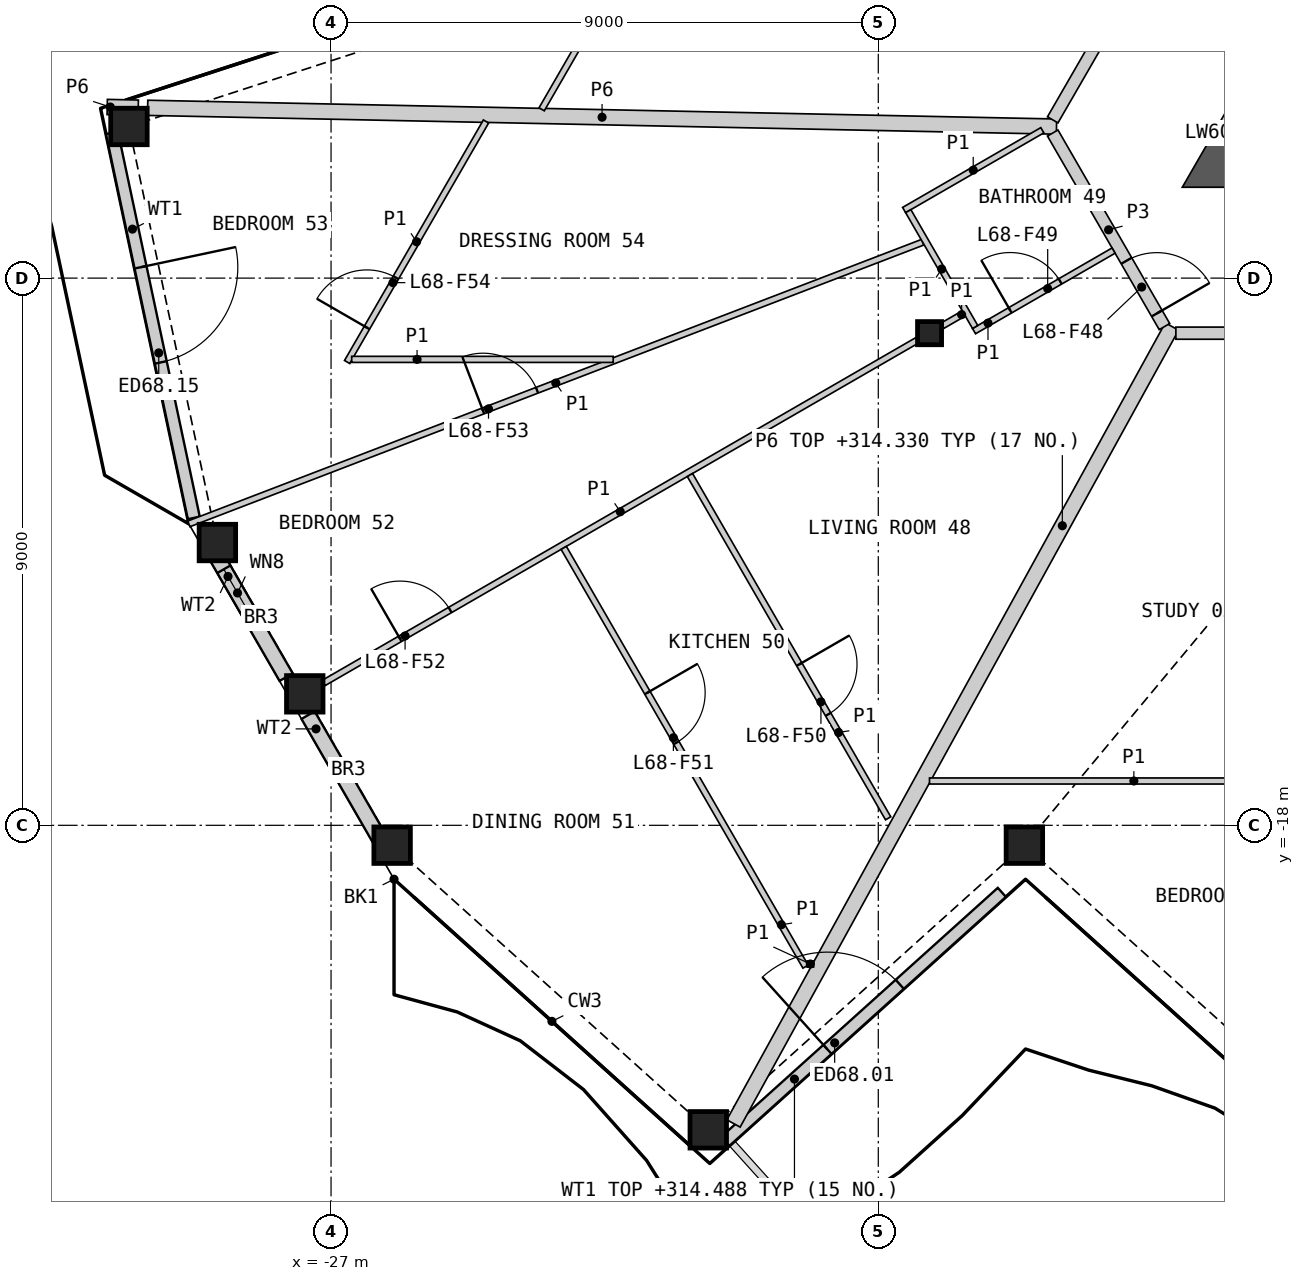
"""IFC4 building model, lengths in metres.
Left out: names, types, materials, properties, quantities, classifications, styles, units other than length and angle.
Written with IfcOpenShell. Run it as: python <this file> out.ifc"""

import sys

from ifc_helpers import new_model, si_unit, direction, frame, frame_2d, origin, origin_2d, place, context, subcontext, project, spatial, polyline, rectangle, hollow_rectangle, i_section, outline, extrude, element, fill, save


model = new_model("IFC4")
c1 = context("Model", 3, precision=1e-05, world=origin(), true_north=direction((0.0, 1.0)))
c2 = subcontext(c1, "Body", "Model", "MODEL_VIEW")
j1 = project(units=[si_unit("LENGTHUNIT", "METRE"), si_unit("PLANEANGLEUNIT", "RADIAN")], contexts=[c1])
p1 = place(None, origin())
s1 = spatial("IfcSite", under=j1, at=p1, CompositionType="ELEMENT")
p2 = place(p1, origin())
s2 = spatial("IfcBuilding", under=s1, at=p2, CompositionType="ELEMENT")
p3 = place(p2, frame((0.0, 0.0, 312.0)))
s3 = spatial("IfcBuildingStorey", under=s2, at=p3, CompositionType="ELEMENT", Elevation=312.0)
for number, where, z_axis, x_axis in (
    (1, (-25.995, -18.327, 0.0), (0.0, 0.0, 1.0), (1.0, 0.0, 0.0)),
    (2, (-20.796, -23.008, 0.0), (0.0, 0.0, 1.0), (1.0, 0.0, 0.0)),
    (3, (-15.597, -18.327, 0.0), (0.0, 0.0, 1.0), (1.0, 0.0, 0.0)),
    (4, (-30.324, -6.506, 0.0), (0.0, 0.0, 1.0), (1.0, 0.0, 0.0)),
    (5, (-28.869, -13.349, 0.0), (0.0, 0.0, 1.0), (1.0, 0.0, 0.0)),
    (6, (-27.432, -15.838, 0.0), (0.0, 0.0, 1.0), (1.0, 0.0, 0.0)),
):
    element("IfcColumn", number, at=place(p3, frame(where, z_axis=z_axis, x_axis=x_axis)), inside=s3, PredefinedType="COLUMN", context=c2, shape_type="SweptSolid", body=[
        extrude(hollow_rectangle(XDim=0.6, YDim=0.6, WallThickness=0.04, at=origin_2d()), origin(), (0.0, 0.0, 1.0), 3.4),
    ])
p4 = place(p3, frame((-17.157, -9.906, 0.0), z_axis=(0.0, 0.0, 1.0), x_axis=(1.0, 0.0, 0.0)))
e7 = element("IfcColumn", 7, at=p4, inside=s3, PredefinedType="COLUMN", context=c2, shape_type="SweptSolid", body=[
    extrude(i_section(OverallWidth=0.396, OverallDepth=0.381, WebThickness=0.019, FlangeThickness=0.03, at=origin_2d()), origin(), (0.0, 0.0, 1.0), 3.4),
])
p5 = place(p3, frame((-20.516, -23.198, 0.0), z_axis=(0.0, 0.0, 1.0), x_axis=(0.743121537674, 0.66915646918, 0.0)))
e8 = element("IfcWall", 8, at=p5, inside=s3, PredefinedType="SOLIDWALL", context=c2, shape_type="SweptSolid", body=[
    extrude(rectangle(XDim=6.12, YDim=0.2, at=frame_2d((3.06, 0.0))), origin(), (0.0, 0.0, 1.0), 2.488),
])
p6 = place(p5, frame((2.26, 0.0, 0.0)))
e9 = element("IfcOpeningElement", 9, at=p6, cuts=e8, PredefinedType="OPENING", context=c2, shape_type="SweptSolid", body=[
    extrude(rectangle(XDim=1.6, YDim=2.25, at=frame_2d((0.8, 1.125))), frame((0.0, 0.11, 0.0), z_axis=(0.0, -1.0, 0.0), x_axis=(1.0, 0.0, 0.0)), (0.0, 0.0, 1.0), 0.22),
])
p7 = place(p3, frame((-30.603, -6.611, 0.0), z_axis=(0.0, 0.0, 1.0), x_axis=(0.207921893309, -0.978145432072, 0.0)))
e10 = element("IfcWall", 10, at=p7, inside=s3, PredefinedType="SOLIDWALL", context=c2, shape_type="SweptSolid", body=[
    extrude(rectangle(XDim=6.475, YDim=0.2, at=frame_2d((3.237, 0.0))), origin(), (0.0, 0.0, 1.0), 2.488),
])
p8 = place(p7, frame((2.26, 0.0, 0.0)))
e11 = element("IfcOpeningElement", 11, at=p8, cuts=e10, PredefinedType="OPENING", context=c2, shape_type="SweptSolid", body=[
    extrude(rectangle(XDim=1.6, YDim=2.25, at=frame_2d((0.8, 1.125))), frame((0.0, 0.11, 0.0), z_axis=(0.0, -1.0, 0.0), x_axis=(1.0, 0.0, 0.0)), (0.0, 0.0, 1.0), 0.22),
])
p9 = place(p3, frame((-29.013, -13.356, 0.0), z_axis=(0.0, 0.0, 1.0), x_axis=(0.500012659481, -0.866018094706, 0.0)))
e12 = element("IfcWall", 12, at=p9, inside=s3, PredefinedType="SOLIDWALL", context=c2, shape_type="SweptSolid", body=[
    extrude(rectangle(XDim=2.549, YDim=0.25, at=frame_2d((1.274, 0.0))), origin(), (0.0, 0.0, 1.0), 2.488),
])
p10 = place(p9, frame((0.5, 0.0, 1.5)))
e13 = element("IfcOpeningElement", 13, at=p10, cuts=e12, PredefinedType="OPENING", context=c2, shape_type="SweptSolid", body=[
    extrude(rectangle(XDim=0.9, YDim=0.7, at=frame_2d((0.45, 0.35))), frame((0.0, 0.135, 0.0), z_axis=(0.0, -1.0, 0.0), x_axis=(1.0, 0.0, 0.0)), (0.0, 0.0, 1.0), 0.27),
])
p11 = place(p3, frame((-27.378, -16.188, 0.0), z_axis=(0.0, 0.0, 1.0), x_axis=(0.499992367345, -0.866029810455, 0.0)))
e14 = element("IfcWall", 14, at=p11, inside=s3, PredefinedType="SOLIDWALL", context=c2, shape_type="SweptSolid", body=[
    extrude(rectangle(XDim=2.61, YDim=0.25, at=frame_2d((1.305, 0.0))), origin(), (0.0, 0.0, 1.0), 2.488),
])
p12 = place(p3, origin())
e15 = element("IfcWall", 15, at=p12, inside=s3, PredefinedType="SHEAR", context=c2, shape_type="SweptSolid", body=[
    extrude(outline(polyline([(-12.48, -6.606), (-11.961, -6.906), (-11.961, -7.506), (-13.0, -7.506), (-12.48, -6.606)])), origin(), (0.0, 0.0, 1.0), 3.1),
])
p13 = place(p3, frame((-10.925, -4.511, 0.0), z_axis=(0.0, 0.0, 1.0), x_axis=(-0.500018667571, -0.866014625789, 0.0)))
e16 = element("IfcWall", 16, at=p13, inside=s3, PredefinedType="SHEAR", context=c2, shape_type="SweptSolid", body=[
    extrude(rectangle(XDim=2.592, YDim=0.6, at=frame_2d((1.296, 0.0))), origin(), (0.0, 0.0, 1.0), 3.1),
])
p14 = place(p13, frame((0.6, 0.0, 0.0)))
e17 = element("IfcOpeningElement", 17, at=p14, cuts=e16, PredefinedType="OPENING", context=c2, shape_type="SweptSolid", body=[
    extrude(rectangle(XDim=1.0, YDim=2.1, at=frame_2d((0.5, 1.05))), frame((0.0, 0.31, 0.0), z_axis=(0.0, -1.0, 0.0), x_axis=(1.0, 0.0, 0.0)), (0.0, 0.0, 1.0), 0.62),
])
p15 = place(p3, frame((-20.381, -22.904, 0.0), z_axis=(0.0, 0.0, 1.0), x_axis=(0.481994550341, 0.876174214093, 0.0)))
e18 = element("IfcWall", 18, at=p15, inside=s3, PredefinedType="PARTITIONING", context=c2, shape_type="SweptSolid", body=[
    extrude(rectangle(XDim=14.96, YDim=0.25, at=frame_2d((7.48, 0.0))), origin(), (0.0, 0.0, 1.0), 2.33),
])
p16 = place(p3, frame((-30.016, -6.199, 0.0), z_axis=(0.0, 0.0, 1.0), x_axis=(0.999786619639, -0.02065708573, 0.0)))
e19 = element("IfcWall", 19, at=p16, inside=s3, PredefinedType="PARTITIONING", context=c2, shape_type="SweptSolid", body=[
    extrude(rectangle(XDim=14.951, YDim=0.25, at=frame_2d((7.475, 0.0))), origin(), (0.0, 0.0, 1.0), 2.33),
])
p17 = place(p3, frame((-13.106, -9.906, 0.0), z_axis=(0.0, 0.0, 1.0), x_axis=(1.0, 0.0, 0.0)))
e20 = element("IfcWall", 20, at=p17, inside=s3, PredefinedType="PARTITIONING", context=c2, shape_type="SweptSolid", body=[
    extrude(rectangle(XDim=4.32, YDim=0.2, at=frame_2d((2.16, 0.0))), origin(), (0.0, 0.0, 1.0), 3.1),
])
p18 = place(p3, frame((-15.131, -6.397, 0.0), z_axis=(0.0, 0.0, 1.0), x_axis=(0.500003406062, 0.866023437285, 0.0)))
e21 = element("IfcWall", 21, at=p18, inside=s3, PredefinedType="PARTITIONING", context=c2, shape_type="SweptSolid", body=[
    extrude(rectangle(XDim=4.288, YDim=0.2, at=frame_2d((2.144, 0.0))), origin(), (0.0, 0.0, 1.0), 3.1),
])
p19 = place(p3, frame((-15.131, -6.614, 0.0), z_axis=(0.0, 0.0, 1.0), x_axis=(0.499967746641, -0.866044024469, 0.0)))
e22 = element("IfcWall", 22, at=p19, inside=s3, PredefinedType="PARTITIONING", context=c2, shape_type="SweptSolid", body=[
    extrude(rectangle(XDim=3.676, YDim=0.2, at=frame_2d((1.838, 0.0))), origin(), (0.0, 0.0, 1.0), 3.1),
])
p20 = place(p19, frame((2.426, 0.0, 0.0)))
e23 = element("IfcOpeningElement", 23, at=p20, cuts=e22, PredefinedType="OPENING", context=c2, shape_type="SweptSolid", body=[
    extrude(rectangle(XDim=1.0, YDim=2.1, at=frame_2d((0.5, 1.05))), frame((0.0, 0.11, 0.0), z_axis=(0.0, -1.0, 0.0), x_axis=(1.0, 0.0, 0.0)), (0.0, 0.0, 1.0), 0.22),
])
p21 = place(p3, frame((-30.681, -6.186, 0.0), z_axis=(0.0, 0.0, 1.0), x_axis=(0.999788216533, -0.020579652135, 0.0)))
e24 = element("IfcWall", 24, at=p21, inside=s3, PredefinedType="PARTITIONING", context=c2, shape_type="SweptSolid", body=[
    extrude(rectangle(XDim=0.51, YDim=0.25, at=frame_2d((0.255, 0.0))), origin(), (0.0, 0.0, 1.0), 2.33),
])
p22 = place(p3, frame((-29.338, -13.042, 0.0), z_axis=(0.0, 0.0, 1.0), x_axis=(0.93358243931, 0.358362705944, 0.0)))
e25 = element("IfcWall", 25, at=p22, inside=s3, PredefinedType="PARTITIONING", context=c2, shape_type="SweptSolid", body=[
    extrude(rectangle(XDim=12.928, YDim=0.1, at=frame_2d((6.464, 0.0))), origin(), (0.0, 0.0, 1.0), 2.33),
])
p23 = place(p22, frame((5.183, 0.0, 0.0)))
e26 = element("IfcOpeningElement", 26, at=p23, cuts=e25, PredefinedType="OPENING", context=c2, shape_type="SweptSolid", body=[
    extrude(rectangle(XDim=0.95, YDim=2.1, at=frame_2d((0.475, 1.05))), frame((0.0, 0.06, 0.0), z_axis=(0.0, -1.0, 0.0), x_axis=(1.0, 0.0, 0.0)), (0.0, 0.0, 1.0), 0.12),
])
p24 = place(p3, frame((-27.122, -15.659, 0.0), z_axis=(0.0, 0.0, 1.0), x_axis=(0.866021046153, 0.500007547564, 0.0)))
e27 = element("IfcWall", 27, at=p24, inside=s3, PredefinedType="PARTITIONING", context=c2, shape_type="SweptSolid", body=[
    extrude(rectangle(XDim=11.267, YDim=0.1, at=frame_2d((5.634, 0.0))), origin(), (0.0, 0.0, 1.0), 2.33),
])
p25 = place(p24, frame((1.452, 0.0, 0.0)))
e28 = element("IfcOpeningElement", 28, at=p25, cuts=e27, PredefinedType="OPENING", context=c2, shape_type="SweptSolid", body=[
    extrude(rectangle(XDim=0.95, YDim=2.1, at=frame_2d((0.475, 1.05))), frame((0.0, 0.06, 0.0), z_axis=(0.0, -1.0, 0.0), x_axis=(1.0, 0.0, 0.0)), (0.0, 0.0, 1.0), 0.12),
])
p26 = place(p3, frame((-23.173, -13.437, 0.0), z_axis=(0.0, 0.0, 1.0), x_axis=(0.500018284498, -0.866014846967, 0.0)))
e29 = element("IfcWall", 29, at=p26, inside=s3, PredefinedType="PARTITIONING", context=c2, shape_type="SweptSolid", body=[
    extrude(rectangle(XDim=7.953, YDim=0.1, at=frame_2d((3.977, 0.0))), origin(), (0.0, 0.0, 1.0), 2.33),
])
p27 = place(p26, frame((2.751, 0.0, 0.0)))
e30 = element("IfcOpeningElement", 30, at=p27, cuts=e29, PredefinedType="OPENING", context=c2, shape_type="SweptSolid", body=[
    extrude(rectangle(XDim=0.95, YDim=2.1, at=frame_2d((0.475, 1.05))), frame((0.0, 0.06, 0.0), z_axis=(0.0, -1.0, 0.0), x_axis=(1.0, 0.0, 0.0)), (0.0, 0.0, 1.0), 0.12),
])
p28 = place(p3, frame((-23.536, -6.224, 0.0), z_axis=(0.0, 0.0, 1.0), x_axis=(0.500002256251, 0.866024101133, 0.0)))
e31 = element("IfcWall", 31, at=p28, inside=s3, PredefinedType="PARTITIONING", context=c2, shape_type="SweptSolid", body=[
    extrude(rectangle(XDim=6.722, YDim=0.1, at=frame_2d((3.361, 0.0))), origin(), (0.0, 0.0, 1.0), 2.33),
])
p29 = place(p28, frame((3.292, 0.0, 0.0)))
e32 = element("IfcOpeningElement", 32, at=p29, cuts=e31, PredefinedType="OPENING", context=c2, shape_type="SweptSolid", body=[
    extrude(rectangle(XDim=0.95, YDim=2.1, at=frame_2d((0.475, 1.05))), frame((0.0, 0.06, 0.0), z_axis=(0.0, -1.0, 0.0), x_axis=(1.0, 0.0, 0.0)), (0.0, 0.0, 1.0), 0.12),
])
p30 = place(p3, frame((-17.158, -17.271, 0.0), z_axis=(0.0, 0.0, 1.0), x_axis=(1.0, 0.0, 0.0)))
e33 = element("IfcWall", 33, at=p30, inside=s3, PredefinedType="PARTITIONING", context=c2, shape_type="SweptSolid", body=[
    extrude(rectangle(XDim=6.722, YDim=0.1, at=frame_2d((3.361, 0.0))), origin(), (0.0, 0.0, 1.0), 2.33),
])
p31 = place(p30, frame((5.015, 0.0, 0.0)))
e34 = element("IfcOpeningElement", 34, at=p31, cuts=e33, PredefinedType="OPENING", context=c2, shape_type="SweptSolid", body=[
    extrude(rectangle(XDim=0.95, YDim=2.1, at=frame_2d((0.475, 1.05))), frame((0.0, 0.06, 0.0), z_axis=(0.0, -1.0, 0.0), x_axis=(1.0, 0.0, 0.0)), (0.0, 0.0, 1.0), 0.12),
])
p32 = place(p3, frame((-21.098, -12.239, 0.0), z_axis=(0.0, 0.0, 1.0), x_axis=(0.499973122483, -0.86604092097, 0.0)))
e35 = element("IfcWall", 35, at=p32, inside=s3, PredefinedType="PARTITIONING", context=c2, shape_type="SweptSolid", body=[
    extrude(rectangle(XDim=6.52, YDim=0.1, at=frame_2d((3.26, 0.0))), origin(), (0.0, 0.0, 1.0), 2.33),
])
p33 = place(p32, frame((3.596, 0.0, 0.0)))
e36 = element("IfcOpeningElement", 36, at=p33, cuts=e35, PredefinedType="OPENING", context=c2, shape_type="SweptSolid", body=[
    extrude(rectangle(XDim=0.95, YDim=2.1, at=frame_2d((0.475, 1.05))), frame((0.0, 0.06, 0.0), z_axis=(0.0, -1.0, 0.0), x_axis=(1.0, 0.0, 0.0)), (0.0, 0.0, 1.0), 0.12),
])
p34 = place(p3, frame((-26.736, -10.38, 0.0), z_axis=(0.0, 0.0, 1.0), x_axis=(0.500024700597, 0.866011142419, 0.0)))
e37 = element("IfcWall", 37, at=p34, inside=s3, PredefinedType="PARTITIONING", context=c2, shape_type="SweptSolid", body=[
    extrude(rectangle(XDim=4.568, YDim=0.1, at=frame_2d((2.284, 0.0))), origin(), (0.0, 0.0, 1.0), 2.33),
])
p35 = place(p34, frame((0.652, 0.0, 0.0)))
e38 = element("IfcOpeningElement", 38, at=p35, cuts=e37, PredefinedType="OPENING", context=c2, shape_type="SweptSolid", body=[
    extrude(rectangle(XDim=0.95, YDim=2.1, at=frame_2d((0.475, 1.05))), frame((0.0, 0.06, 0.0), z_axis=(0.0, -1.0, 0.0), x_axis=(1.0, 0.0, 0.0)), (0.0, 0.0, 1.0), 0.12),
])
p36 = place(p3, frame((-26.66, -10.337, 0.0), z_axis=(0.0, 0.0, 1.0), x_axis=(1.0, 0.0, 0.0)))
e39 = element("IfcWall", 39, at=p36, inside=s3, PredefinedType="PARTITIONING", context=c2, shape_type="SweptSolid", body=[
    extrude(rectangle(XDim=4.301, YDim=0.1, at=frame_2d((2.15, 0.0))), origin(), (0.0, 0.0, 1.0), 2.33),
])
p37 = place(p3, frame((-17.575, -7.881, 0.0), z_axis=(0.0, 0.0, 1.0), x_axis=(0.866013657776, 0.500020344131, 0.0)))
e40 = element("IfcWall", 40, at=p37, inside=s3, PredefinedType="PARTITIONING", context=c2, shape_type="SweptSolid", body=[
    extrude(rectangle(XDim=2.625, YDim=0.1, at=frame_2d((1.312, 0.0))), origin(), (0.0, 0.0, 1.0), 2.33),
])
p38 = place(p3, frame((-16.426, -9.872, 0.0), z_axis=(0.0, 0.0, 1.0), x_axis=(0.866029095148, 0.499993606316, 0.0)))
e41 = element("IfcWall", 41, at=p38, inside=s3, PredefinedType="PARTITIONING", context=c2, shape_type="SweptSolid", body=[
    extrude(rectangle(XDim=2.65, YDim=0.1, at=frame_2d((1.325, 0.0))), origin(), (0.0, 0.0, 1.0), 2.33),
])
p39 = place(p38, frame((0.686, 0.0, 0.0)))
e42 = element("IfcOpeningElement", 42, at=p39, cuts=e41, PredefinedType="OPENING", context=c2, shape_type="SweptSolid", body=[
    extrude(rectangle(XDim=0.95, YDim=2.1, at=frame_2d((0.475, 1.05))), frame((0.0, 0.06, 0.0), z_axis=(0.0, -1.0, 0.0), x_axis=(1.0, 0.0, 0.0)), (0.0, 0.0, 1.0), 0.12),
])
p40 = place(p3, frame((-17.507, -7.899, 0.0), z_axis=(0.0, 0.0, 1.0), x_axis=(0.499946605688, -0.86605622881, 0.0)))
e43 = element("IfcWall", 43, at=p40, inside=s3, PredefinedType="PARTITIONING", context=c2, shape_type="SweptSolid", body=[
    extrude(rectangle(XDim=2.2, YDim=0.1, at=frame_2d((1.1, 0.0))), origin(), (0.0, 0.0, 1.0), 2.33),
])
p41 = place(p3, frame((-16.949, -9.786, 0.0), z_axis=(0.0, 0.0, 1.0), x_axis=(0.866036909293, 0.499980071345, 0.0)))
e44 = element("IfcWall", 44, at=p41, inside=s3, PredefinedType="PARTITIONING", context=c2, shape_type="SweptSolid", body=[
    extrude(rectangle(XDim=0.41, YDim=0.1, at=frame_2d((0.205, 0.0))), origin(), (0.0, 0.0, 1.0), 2.33),
])
p42 = place(p3, frame((-19.171, -20.281, 0.0), z_axis=(0.0, 0.0, 1.0), x_axis=(1.0, 0.0, 0.0)))
e45 = element("IfcWall", 45, at=p42, inside=s3, PredefinedType="PARTITIONING", context=c2, shape_type="SweptSolid", body=[
    extrude(rectangle(XDim=0.108, YDim=0.1, at=frame_2d((0.054, 0.0))), origin(), (0.0, 0.0, 1.0), 2.33),
])
p43 = place(p6, origin())
e46 = element("IfcDoor", 46, at=p43, inside=s3, OperationType="DOUBLE_DOOR_SINGLE_SWING", PredefinedType="DOOR", context=c2, shape_type="SweptSolid", body=[
    extrude(rectangle(XDim=1.6, YDim=2.25, at=frame_2d((0.8, 1.125))), frame((0.0, 0.025, 0.0), z_axis=(0.0, -1.0, 0.0), x_axis=(1.0, 0.0, 0.0)), (0.0, 0.0, 1.0), 0.05),
])
fill(e9, e46)
p44 = place(p8, origin())
e47 = element("IfcDoor", 47, at=p44, inside=s3, OperationType="DOUBLE_DOOR_SINGLE_SWING", PredefinedType="DOOR", context=c2, shape_type="SweptSolid", body=[
    extrude(rectangle(XDim=1.6, YDim=2.25, at=frame_2d((0.8, 1.125))), frame((0.0, 0.025, 0.0), z_axis=(0.0, -1.0, 0.0), x_axis=(1.0, 0.0, 0.0)), (0.0, 0.0, 1.0), 0.05),
])
fill(e11, e47)
p45 = place(p10, origin())
e48 = element("IfcWindow", 48, at=p45, inside=s3, PartitioningType="SINGLE_PANEL", PredefinedType="WINDOW", context=c2, shape_type="SweptSolid", body=[
    extrude(rectangle(XDim=0.9, YDim=0.7, at=frame_2d((0.45, 0.35))), frame((0.0, 0.03, 0.0), z_axis=(0.0, -1.0, 0.0), x_axis=(1.0, 0.0, 0.0)), (0.0, 0.0, 1.0), 0.06),
])
fill(e13, e48)
p46 = place(p20, origin())
e49 = element("IfcDoor", 49, at=p46, inside=s3, OperationType="SINGLE_SWING_RIGHT", PredefinedType="DOOR", context=c2, shape_type="SweptSolid", body=[
    extrude(rectangle(XDim=1.0, YDim=2.1, at=frame_2d((0.5, 1.05))), frame((0.0, 0.025, 0.0), z_axis=(0.0, -1.0, 0.0), x_axis=(1.0, 0.0, 0.0)), (0.0, 0.0, 1.0), 0.05),
])
fill(e23, e49)
p47 = place(p39, origin())
e50 = element("IfcDoor", 50, at=p47, inside=s3, OperationType="SINGLE_SWING_LEFT", PredefinedType="DOOR", context=c2, shape_type="SweptSolid", body=[
    extrude(rectangle(XDim=0.95, YDim=2.1, at=frame_2d((0.475, 1.05))), frame((0.0, 0.025, 0.0), z_axis=(0.0, -1.0, 0.0), x_axis=(1.0, 0.0, 0.0)), (0.0, 0.0, 1.0), 0.05),
])
fill(e42, e50)
p48 = place(p33, origin())
e51 = element("IfcDoor", 51, at=p48, inside=s3, OperationType="SINGLE_SWING_LEFT", PredefinedType="DOOR", context=c2, shape_type="SweptSolid", body=[
    extrude(rectangle(XDim=0.95, YDim=2.1, at=frame_2d((0.475, 1.05))), frame((0.0, 0.025, 0.0), z_axis=(0.0, -1.0, 0.0), x_axis=(1.0, 0.0, 0.0)), (0.0, 0.0, 1.0), 0.05),
])
fill(e36, e51)
p49 = place(p27, origin())
e52 = element("IfcDoor", 52, at=p49, inside=s3, OperationType="SINGLE_SWING_LEFT", PredefinedType="DOOR", context=c2, shape_type="SweptSolid", body=[
    extrude(rectangle(XDim=0.95, YDim=2.1, at=frame_2d((0.475, 1.05))), frame((0.0, 0.025, 0.0), z_axis=(0.0, -1.0, 0.0), x_axis=(1.0, 0.0, 0.0)), (0.0, 0.0, 1.0), 0.05),
])
fill(e30, e52)
p50 = place(p25, origin())
e53 = element("IfcDoor", 53, at=p50, inside=s3, OperationType="SINGLE_SWING_LEFT", PredefinedType="DOOR", context=c2, shape_type="SweptSolid", body=[
    extrude(rectangle(XDim=0.95, YDim=2.1, at=frame_2d((0.475, 1.05))), frame((0.0, 0.025, 0.0), z_axis=(0.0, -1.0, 0.0), x_axis=(1.0, 0.0, 0.0)), (0.0, 0.0, 1.0), 0.05),
])
fill(e28, e53)
p51 = place(p23, origin())
e54 = element("IfcDoor", 54, at=p51, inside=s3, OperationType="SINGLE_SWING_LEFT", PredefinedType="DOOR", context=c2, shape_type="SweptSolid", body=[
    extrude(rectangle(XDim=0.95, YDim=2.1, at=frame_2d((0.475, 1.05))), frame((0.0, 0.025, 0.0), z_axis=(0.0, -1.0, 0.0), x_axis=(1.0, 0.0, 0.0)), (0.0, 0.0, 1.0), 0.05),
])
fill(e26, e54)
p52 = place(p35, origin())
e55 = element("IfcDoor", 55, at=p52, inside=s3, OperationType="SINGLE_SWING_LEFT", PredefinedType="DOOR", context=c2, shape_type="SweptSolid", body=[
    extrude(rectangle(XDim=0.95, YDim=2.1, at=frame_2d((0.475, 1.05))), frame((0.0, 0.025, 0.0), z_axis=(0.0, -1.0, 0.0), x_axis=(1.0, 0.0, 0.0)), (0.0, 0.0, 1.0), 0.05),
])
fill(e38, e55)
save(model, sys.argv[1])
